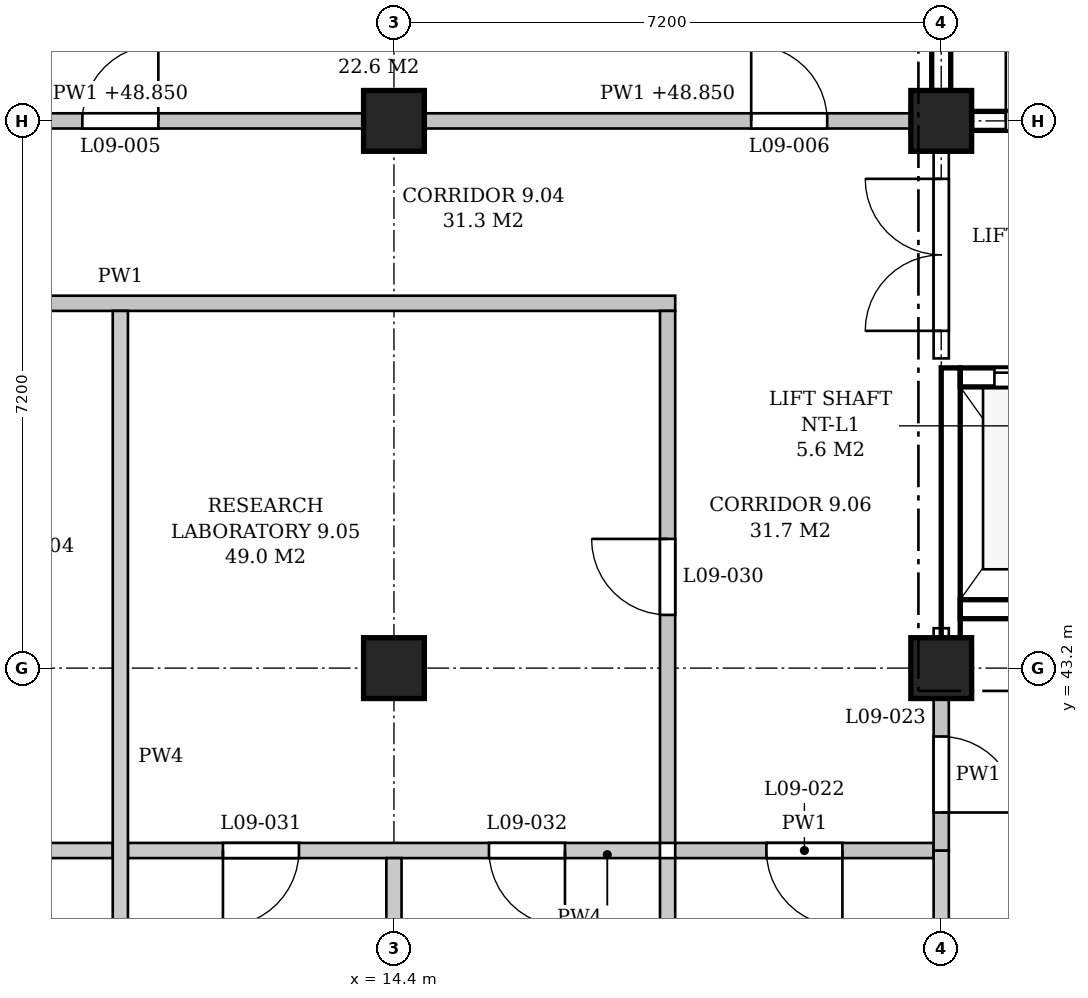
"""IFC4 building model, lengths in metres.
Left out: names, types, materials, properties, quantities, classifications, styles, units other than length and angle.
Written with IfcOpenShell. Run it as: python <this file> out.ifc"""

import sys

from ifc_helpers import new_model, si_unit, direction, frame, frame_2d, origin, origin_2d, place, context, subcontext, project, spatial, polyline, rectangle, outline, extrude, element, fill, save


model = new_model("IFC4")
c1 = context("Model", 3, precision=1e-05, world=origin(), true_north=direction((0.0, 1.0)))
c2 = subcontext(c1, "Body", "Model", "MODEL_VIEW")
j1 = project(units=[si_unit("LENGTHUNIT", "METRE"), si_unit("PLANEANGLEUNIT", "RADIAN")], contexts=[c1])
p1 = place(None, origin())
s1 = spatial("IfcSite", under=j1, at=p1, CompositionType="ELEMENT")
p2 = place(p1, origin())
s2 = spatial("IfcBuilding", under=s1, at=p2, CompositionType="ELEMENT")
p3 = place(p2, frame((0.0, 0.0, 45.3)))
s3 = spatial("IfcBuildingStorey", under=s2, at=p3, CompositionType="ELEMENT", Elevation=45.3)
for number, where, z_axis, x_axis in (
    (1, (14.4, 43.2, 0.0), (0.0, 0.0, 1.0), (1.0, 0.0, 0.0)),
    (2, (14.4, 50.4, 0.0), (0.0, 0.0, 1.0), (1.0, 0.0, 0.0)),
    (3, (21.6, 43.2, 0.0), (0.0, 0.0, 1.0), (1.0, 0.0, 0.0)),
    (4, (21.6, 50.4, 0.0), (0.0, 0.0, 1.0), (1.0, 0.0, 0.0)),
):
    element("IfcColumn", number, at=place(p3, frame(where, z_axis=z_axis, x_axis=x_axis)), inside=s3, PredefinedType="COLUMN", context=c2, shape_type="SweptSolid", body=[
        extrude(rectangle(XDim=0.8, YDim=0.8, at=origin_2d()), origin(), (0.0, 0.0, 1.0), 4.5),
    ])
p4 = place(p3, frame((22.0, 50.4, 0.0), z_axis=(0.0, 0.0, 1.0), x_axis=(1.0, 0.0, 0.0)))
e5 = element("IfcWall", 5, at=p4, inside=s3, PredefinedType="SHEAR", context=c2, shape_type="SweptSolid", body=[
    extrude(rectangle(XDim=6.4, YDim=0.25, at=frame_2d((3.2, 0.0))), origin(), (0.0, 0.0, 1.0), 3.55),
])
p5 = place(p4, frame((0.45, 0.0, 0.0)))
e6 = element("IfcOpeningElement", 6, at=p5, cuts=e5, PredefinedType="OPENING", context=c2, shape_type="SweptSolid", body=[
    extrude(rectangle(XDim=1.1, YDim=2.1, at=frame_2d((0.55, 1.05))), frame((0.0, 0.135, 0.0), z_axis=(0.0, -1.0, 0.0), x_axis=(1.0, 0.0, 0.0)), (0.0, 0.0, 1.0), 0.27),
])
p6 = place(p3, frame((21.6, 50.8, 0.0), z_axis=(0.0, 0.0, 1.0), x_axis=(0.0, 1.0, 0.0)))
e7 = element("IfcWall", 7, at=p6, inside=s3, PredefinedType="SHEAR", context=c2, shape_type="SweptSolid", body=[
    extrude(rectangle(XDim=6.4, YDim=0.25, at=frame_2d((3.2, 0.0))), origin(), (0.0, 0.0, 1.0), 3.55),
])
p7 = place(p3, frame((21.725, 43.6, -0.25), z_axis=(0.0, 0.0, 1.0), x_axis=(0.0, 1.0, 0.0)))
e8 = element("IfcWall", 8, at=p7, inside=s3, PredefinedType="SHEAR", context=c2, shape_type="SweptSolid", body=[
    extrude(rectangle(XDim=3.55, YDim=0.25, at=frame_2d((1.775, 0.0))), origin(), (0.0, 0.0, 1.0), 3.8),
])
p8 = place(p3, frame((21.85, 47.025, -0.25), z_axis=(0.0, 0.0, 1.0), x_axis=(1.0, 0.0, 0.0)))
e9 = element("IfcWall", 9, at=p8, inside=s3, PredefinedType="SHEAR", context=c2, shape_type="SweptSolid", body=[
    extrude(rectangle(XDim=2.0, YDim=0.25, at=frame_2d((1.0, 0.0))), origin(), (0.0, 0.0, 1.0), 4.5),
])
p9 = place(p8, frame((0.45, 0.0, 0.25)))
e10 = element("IfcOpeningElement", 10, at=p9, cuts=e9, PredefinedType="OPENING", context=c2, shape_type="SweptSolid", body=[
    extrude(rectangle(XDim=1.1, YDim=2.1, at=frame_2d((0.55, 1.05))), frame((0.0, 0.135, 0.0), z_axis=(0.0, -1.0, 0.0), x_axis=(1.0, 0.0, 0.0)), (0.0, 0.0, 1.0), 0.27),
])
p10 = place(p3, frame((21.85, 43.975, -0.25), z_axis=(0.0, 0.0, 1.0), x_axis=(1.0, 0.0, 0.0)))
e11 = element("IfcWall", 11, at=p10, inside=s3, PredefinedType="SHEAR", context=c2, shape_type="SweptSolid", body=[
    extrude(rectangle(XDim=2.0, YDim=0.25, at=frame_2d((1.0, 0.0))), origin(), (0.0, 0.0, 1.0), 4.5),
])
p11 = place(p3, frame((7.3, 40.8, 0.0), z_axis=(0.0, 0.0, 1.0), x_axis=(1.0, 0.0, 0.0)))
e12 = element("IfcWall", 12, at=p11, inside=s3, PredefinedType="PARTITIONING", context=c2, shape_type="SweptSolid", body=[
    extrude(outline(polyline([(0.0, 0.0), (3.4, 0.0), (3.4, 4.25), (0.125, 4.25), (0.125, 3.55), (0.0, 3.55), (0.0, 0.0)])), frame((0.0, 0.1, 0.0), z_axis=(0.0, -1.0, 0.0), x_axis=(1.0, 0.0, 0.0)), (0.0, 0.0, 1.0), 0.2),
])
p12 = place(p11, frame((1.2, 0.0, 0.0)))
e13 = element("IfcOpeningElement", 13, at=p12, cuts=e12, PredefinedType="OPENING", context=c2, shape_type="SweptSolid", body=[
    extrude(rectangle(XDim=1.0, YDim=2.1, at=frame_2d((0.5, 1.05))), frame((0.0, 0.11, 0.0), z_axis=(0.0, -1.0, 0.0), x_axis=(1.0, 0.0, 0.0)), (0.0, 0.0, 1.0), 0.22),
])
p13 = place(p3, frame((10.9, 40.8, 0.0), z_axis=(0.0, 0.0, 1.0), x_axis=(1.0, 0.0, 0.0)))
e14 = element("IfcWall", 14, at=p13, inside=s3, PredefinedType="PARTITIONING", context=c2, shape_type="SweptSolid", body=[
    extrude(outline(polyline([(0.0, 0.0), (7.0, 0.0), (7.0, 4.25), (3.725, 4.25), (3.725, 3.55), (3.275, 3.55), (3.275, 4.25), (0.0, 4.25), (0.0, 0.0)])), frame((0.0, 0.1, 0.0), z_axis=(0.0, -1.0, 0.0), x_axis=(1.0, 0.0, 0.0)), (0.0, 0.0, 1.0), 0.2),
])
p14 = place(p13, frame((1.25, 0.0, 0.0)))
e15 = element("IfcOpeningElement", 15, at=p14, cuts=e14, PredefinedType="OPENING", context=c2, shape_type="SweptSolid", body=[
    extrude(rectangle(XDim=1.0, YDim=2.1, at=frame_2d((0.5, 1.05))), frame((0.0, 0.11, 0.0), z_axis=(0.0, -1.0, 0.0), x_axis=(1.0, 0.0, 0.0)), (0.0, 0.0, 1.0), 0.22),
])
p15 = place(p13, frame((4.75, 0.0, 0.0)))
e16 = element("IfcOpeningElement", 16, at=p15, cuts=e14, PredefinedType="OPENING", context=c2, shape_type="SweptSolid", body=[
    extrude(rectangle(XDim=1.0, YDim=2.1, at=frame_2d((0.5, 1.05))), frame((0.0, 0.11, 0.0), z_axis=(0.0, -1.0, 0.0), x_axis=(1.0, 0.0, 0.0)), (0.0, 0.0, 1.0), 0.22),
])
p16 = place(p3, frame((18.1, 40.8, 0.0), z_axis=(0.0, 0.0, 1.0), x_axis=(1.0, 0.0, 0.0)))
e17 = element("IfcWall", 17, at=p16, inside=s3, PredefinedType="PARTITIONING", context=c2, shape_type="SweptSolid", body=[
    extrude(outline(polyline([(0.0, 0.0), (3.4, 0.0), (3.4, 3.55), (3.275, 3.55), (3.275, 4.25), (0.0, 4.25), (0.0, 0.0)])), frame((0.0, 0.1, 0.0), z_axis=(0.0, -1.0, 0.0), x_axis=(1.0, 0.0, 0.0)), (0.0, 0.0, 1.0), 0.2),
])
p17 = place(p16, frame((1.2, 0.0, 0.0)))
e18 = element("IfcOpeningElement", 18, at=p17, cuts=e17, PredefinedType="OPENING", context=c2, shape_type="SweptSolid", body=[
    extrude(rectangle(XDim=1.0, YDim=2.1, at=frame_2d((0.5, 1.05))), frame((0.0, 0.11, 0.0), z_axis=(0.0, -1.0, 0.0), x_axis=(1.0, 0.0, 0.0)), (0.0, 0.0, 1.0), 0.22),
])
p18 = place(p3, frame((3.5, 48.0, 0.0), z_axis=(0.0, 0.0, 1.0), x_axis=(1.0, 0.0, 0.0)))
e19 = element("IfcWall", 19, at=p18, inside=s3, PredefinedType="PARTITIONING", context=c2, shape_type="SweptSolid", body=[
    extrude(outline(polyline([(0.0, 0.0), (14.6, 0.0), (14.6, 4.25), (11.125, 4.25), (11.125, 3.55), (10.675, 3.55), (10.675, 4.25), (3.925, 4.25), (3.925, 3.55), (3.475, 3.55), (3.475, 4.25), (0.0, 4.25), (0.0, 0.0)])), frame((0.0, 0.1, 0.0), z_axis=(0.0, -1.0, 0.0), x_axis=(1.0, 0.0, 0.0)), (0.0, 0.0, 1.0), 0.2),
])
p19 = place(p18, frame((1.4, 0.0, 0.0)))
e20 = element("IfcOpeningElement", 20, at=p19, cuts=e19, PredefinedType="OPENING", context=c2, shape_type="SweptSolid", body=[
    extrude(rectangle(XDim=1.0, YDim=2.1, at=frame_2d((0.5, 1.05))), frame((0.0, 0.11, 0.0), z_axis=(0.0, -1.0, 0.0), x_axis=(1.0, 0.0, 0.0)), (0.0, 0.0, 1.0), 0.22),
])
p20 = place(p18, frame((5.0, 0.0, 0.0)))
e21 = element("IfcOpeningElement", 21, at=p20, cuts=e19, PredefinedType="OPENING", context=c2, shape_type="SweptSolid", body=[
    extrude(rectangle(XDim=1.0, YDim=2.1, at=frame_2d((0.5, 1.05))), frame((0.0, 0.11, 0.0), z_axis=(0.0, -1.0, 0.0), x_axis=(1.0, 0.0, 0.0)), (0.0, 0.0, 1.0), 0.22),
])
p21 = place(p3, frame((7.6, 50.4, 0.0), z_axis=(0.0, 0.0, 1.0), x_axis=(1.0, 0.0, 0.0)))
e22 = element("IfcWall", 22, at=p21, inside=s3, PredefinedType="PARTITIONING", context=c2, shape_type="SweptSolid", body=[
    extrude(rectangle(XDim=6.4, YDim=0.2, at=frame_2d((3.2, 0.0))), origin(), (0.0, 0.0, 1.0), 3.55),
])
p22 = place(p21, frame((2.7, 0.0, 0.0)))
e23 = element("IfcOpeningElement", 23, at=p22, cuts=e22, PredefinedType="OPENING", context=c2, shape_type="SweptSolid", body=[
    extrude(rectangle(XDim=1.0, YDim=2.1, at=frame_2d((0.5, 1.05))), frame((0.0, 0.11, 0.0), z_axis=(0.0, -1.0, 0.0), x_axis=(1.0, 0.0, 0.0)), (0.0, 0.0, 1.0), 0.22),
])
p23 = place(p3, frame((14.8, 50.4, 0.0), z_axis=(0.0, 0.0, 1.0), x_axis=(1.0, 0.0, 0.0)))
e24 = element("IfcWall", 24, at=p23, inside=s3, PredefinedType="PARTITIONING", context=c2, shape_type="SweptSolid", body=[
    extrude(rectangle(XDim=6.4, YDim=0.2, at=frame_2d((3.2, 0.0))), origin(), (0.0, 0.0, 1.0), 3.55),
])
p24 = place(p23, frame((4.3, 0.0, 0.0)))
e25 = element("IfcOpeningElement", 25, at=p24, cuts=e24, PredefinedType="OPENING", context=c2, shape_type="SweptSolid", body=[
    extrude(rectangle(XDim=1.0, YDim=2.1, at=frame_2d((0.5, 1.05))), frame((0.0, 0.11, 0.0), z_axis=(0.0, -1.0, 0.0), x_axis=(1.0, 0.0, 0.0)), (0.0, 0.0, 1.0), 0.22),
])
p25 = place(p3, frame((10.8, 36.15, 0.0), z_axis=(0.0, 0.0, 1.0), x_axis=(0.0, 1.0, 0.0)))
e26 = element("IfcWall", 26, at=p25, inside=s3, PredefinedType="PARTITIONING", context=c2, shape_type="SweptSolid", body=[
    extrude(outline(polyline([(0.0, 0.0), (11.75, 0.0), (11.75, 4.25), (7.275, 4.25), (7.275, 3.55), (6.825, 3.55), (6.825, 4.25), (0.05, 4.25), (0.05, 3.65), (0.0, 3.65), (0.0, 0.0)])), frame((0.0, 0.1, 0.0), z_axis=(0.0, -1.0, 0.0), x_axis=(1.0, 0.0, 0.0)), (0.0, 0.0, 1.0), 0.2),
])
p26 = place(p3, frame((14.4, 36.4, 0.0), z_axis=(0.0, 0.0, 1.0), x_axis=(0.0, 1.0, 0.0)))
e27 = element("IfcWall", 27, at=p26, inside=s3, PredefinedType="PARTITIONING", context=c2, shape_type="SweptSolid", body=[
    extrude(rectangle(XDim=4.3, YDim=0.2, at=frame_2d((2.15, 0.0))), origin(), (0.0, 0.0, 1.0), 3.55),
])
p27 = place(p3, frame((18.0, 36.15, 0.0), z_axis=(0.0, 0.0, 1.0), x_axis=(0.0, 1.0, 0.0)))
e28 = element("IfcWall", 28, at=p27, inside=s3, PredefinedType="PARTITIONING", context=c2, shape_type="SweptSolid", body=[
    extrude(outline(polyline([(0.0, 0.0), (4.55, 0.0), (4.55, 4.25), (0.05, 4.25), (0.05, 3.65), (0.0, 3.65), (0.0, 0.0)])), frame((0.0, 0.1, 0.0), z_axis=(0.0, -1.0, 0.0), x_axis=(1.0, 0.0, 0.0)), (0.0, 0.0, 1.0), 0.2),
])
p28 = place(p3, frame((18.0, 40.9, 0.0), z_axis=(0.0, 0.0, 1.0), x_axis=(0.0, 1.0, 0.0)))
e29 = element("IfcWall", 29, at=p28, inside=s3, PredefinedType="PARTITIONING", context=c2, shape_type="SweptSolid", body=[
    extrude(outline(polyline([(0.0, 0.0), (7.0, 0.0), (7.0, 4.25), (2.525, 4.25), (2.525, 3.55), (2.075, 3.55), (2.075, 4.25), (0.0, 4.25), (0.0, 0.0)])), frame((0.0, 0.1, 0.0), z_axis=(0.0, -1.0, 0.0), x_axis=(1.0, 0.0, 0.0)), (0.0, 0.0, 1.0), 0.2),
])
p29 = place(p28, frame((3.0, 0.0, 0.0)))
e30 = element("IfcOpeningElement", 30, at=p29, cuts=e29, PredefinedType="OPENING", context=c2, shape_type="SweptSolid", body=[
    extrude(rectangle(XDim=1.0, YDim=2.1, at=frame_2d((0.5, 1.05))), frame((0.0, 0.11, 0.0), z_axis=(0.0, -1.0, 0.0), x_axis=(1.0, 0.0, 0.0)), (0.0, 0.0, 1.0), 0.22),
])
p30 = place(p3, frame((21.6, 36.4, 0.0), z_axis=(0.0, 0.0, 1.0), x_axis=(0.0, 1.0, 0.0)))
e31 = element("IfcWall", 31, at=p30, inside=s3, PredefinedType="PARTITIONING", context=c2, shape_type="SweptSolid", body=[
    extrude(rectangle(XDim=4.4, YDim=0.2, at=frame_2d((2.2, 0.0))), origin(), (0.0, 0.0, 1.0), 3.55),
])
p31 = place(p3, frame((21.6, 40.8, 0.0), z_axis=(0.0, 0.0, 1.0), x_axis=(0.0, 1.0, 0.0)))
e32 = element("IfcWall", 32, at=p31, inside=s3, PredefinedType="PARTITIONING", context=c2, shape_type="SweptSolid", body=[
    extrude(rectangle(XDim=2.0, YDim=0.2, at=frame_2d((1.0, 0.0))), origin(), (0.0, 0.0, 1.0), 3.55),
])
p32 = place(p31, frame((0.5, 0.0, 0.0)))
e33 = element("IfcOpeningElement", 33, at=p32, cuts=e32, PredefinedType="OPENING", context=c2, shape_type="SweptSolid", body=[
    extrude(rectangle(XDim=1.0, YDim=2.1, at=frame_2d((0.5, 1.05))), frame((0.0, 0.11, 0.0), z_axis=(0.0, -1.0, 0.0), x_axis=(1.0, 0.0, 0.0)), (0.0, 0.0, 1.0), 0.22),
])
p33 = place(p3, frame((21.6, 43.6, 0.0), z_axis=(0.0, 0.0, 1.0), x_axis=(0.0, 1.0, 0.0)))
e34 = element("IfcWall", 34, at=p33, inside=s3, PredefinedType="PARTITIONING", context=c2, shape_type="SweptSolid", body=[
    extrude(rectangle(XDim=0.125, YDim=0.2, at=frame_2d((0.062, 0.0))), origin(), (0.0, 0.0, 1.0), 3.55),
])
p34 = place(p3, frame((21.6, 47.275, 0.0), z_axis=(0.0, 0.0, 1.0), x_axis=(0.0, 1.0, 0.0)))
e35 = element("IfcWall", 35, at=p34, inside=s3, PredefinedType="PARTITIONING", context=c2, shape_type="SweptSolid", body=[
    extrude(rectangle(XDim=2.725, YDim=0.2, at=frame_2d((1.363, 0.0))), origin(), (0.0, 0.0, 1.0), 3.55),
])
p35 = place(p34, frame((0.363, 0.0, 0.0)))
e36 = element("IfcOpeningElement", 36, at=p35, cuts=e35, PredefinedType="OPENING", context=c2, shape_type="SweptSolid", body=[
    extrude(rectangle(XDim=2.0, YDim=2.4, at=frame_2d((1.0, 1.2))), frame((0.0, 0.11, 0.0), z_axis=(0.0, -1.0, 0.0), x_axis=(1.0, 0.0, 0.0)), (0.0, 0.0, 1.0), 0.22),
])
p36 = place(p5, origin())
e37 = element("IfcDoor", 37, at=p36, inside=s3, OperationType="SINGLE_SWING_LEFT", PredefinedType="DOOR", context=c2, shape_type="SweptSolid", body=[
    extrude(rectangle(XDim=1.1, YDim=2.1, at=frame_2d((0.55, 1.05))), frame((0.0, 0.025, 0.0), z_axis=(0.0, -1.0, 0.0), x_axis=(1.0, 0.0, 0.0)), (0.0, 0.0, 1.0), 0.05),
])
fill(e6, e37)
p37 = place(p9, origin())
e38 = element("IfcDoor", 38, at=p37, inside=s3, OperationType="SLIDING_TO_LEFT", PredefinedType="DOOR", context=c2, shape_type="SweptSolid", body=[
    extrude(rectangle(XDim=1.1, YDim=2.1, at=frame_2d((0.55, 1.05))), frame((0.0, 0.025, 0.0), z_axis=(0.0, -1.0, 0.0), x_axis=(1.0, 0.0, 0.0)), (0.0, 0.0, 1.0), 0.05),
])
fill(e10, e38)
p38 = place(p35, origin())
e39 = element("IfcDoor", 39, at=p38, inside=s3, OperationType="DOUBLE_DOOR_SINGLE_SWING", PredefinedType="DOOR", context=c2, shape_type="SweptSolid", body=[
    extrude(rectangle(XDim=2.0, YDim=2.4, at=frame_2d((1.0, 1.2))), frame((0.0, 0.025, 0.0), z_axis=(0.0, -1.0, 0.0), x_axis=(1.0, 0.0, 0.0)), (0.0, 0.0, 1.0), 0.05),
])
fill(e36, e39)
p39 = place(p22, origin())
e40 = element("IfcDoor", 40, at=p39, inside=s3, OperationType="SINGLE_SWING_RIGHT", PredefinedType="DOOR", context=c2, shape_type="SweptSolid", body=[
    extrude(rectangle(XDim=1.0, YDim=2.1, at=frame_2d((0.5, 1.05))), frame((0.0, 0.025, 0.0), z_axis=(0.0, -1.0, 0.0), x_axis=(1.0, 0.0, 0.0)), (0.0, 0.0, 1.0), 0.05),
])
fill(e23, e40)
p40 = place(p24, origin())
e41 = element("IfcDoor", 41, at=p40, inside=s3, OperationType="SINGLE_SWING_LEFT", PredefinedType="DOOR", context=c2, shape_type="SweptSolid", body=[
    extrude(rectangle(XDim=1.0, YDim=2.1, at=frame_2d((0.5, 1.05))), frame((0.0, 0.025, 0.0), z_axis=(0.0, -1.0, 0.0), x_axis=(1.0, 0.0, 0.0)), (0.0, 0.0, 1.0), 0.05),
])
fill(e25, e41)
p41 = place(p17, frame((1.0, 0.0, 0.0), z_axis=(0.0, 0.0, 1.0), x_axis=(-1.0, 0.0, 0.0)))
e42 = element("IfcDoor", 42, at=p41, inside=s3, OperationType="SINGLE_SWING_LEFT", PredefinedType="DOOR", context=c2, shape_type="SweptSolid", body=[
    extrude(rectangle(XDim=1.0, YDim=2.1, at=frame_2d((0.5, 1.05))), frame((0.0, 0.025, 0.0), z_axis=(0.0, -1.0, 0.0), x_axis=(1.0, 0.0, 0.0)), (0.0, 0.0, 1.0), 0.05),
])
fill(e18, e42)
p42 = place(p32, frame((1.0, 0.0, 0.0), z_axis=(0.0, 0.0, 1.0), x_axis=(-1.0, 0.0, 0.0)))
e43 = element("IfcDoor", 43, at=p42, inside=s3, OperationType="SINGLE_SWING_RIGHT", PredefinedType="DOOR", context=c2, shape_type="SweptSolid", body=[
    extrude(rectangle(XDim=1.0, YDim=2.1, at=frame_2d((0.5, 1.05))), frame((0.0, 0.025, 0.0), z_axis=(0.0, -1.0, 0.0), x_axis=(1.0, 0.0, 0.0)), (0.0, 0.0, 1.0), 0.05),
])
fill(e33, e43)
p43 = place(p29, origin())
e44 = element("IfcDoor", 44, at=p43, inside=s3, OperationType="SINGLE_SWING_RIGHT", PredefinedType="DOOR", context=c2, shape_type="SweptSolid", body=[
    extrude(rectangle(XDim=1.0, YDim=2.1, at=frame_2d((0.5, 1.05))), frame((0.0, 0.025, 0.0), z_axis=(0.0, -1.0, 0.0), x_axis=(1.0, 0.0, 0.0)), (0.0, 0.0, 1.0), 0.05),
])
fill(e30, e44)
p44 = place(p14, frame((1.0, 0.0, 0.0), z_axis=(0.0, 0.0, 1.0), x_axis=(-1.0, 0.0, 0.0)))
e45 = element("IfcDoor", 45, at=p44, inside=s3, OperationType="SINGLE_SWING_RIGHT", PredefinedType="DOOR", context=c2, shape_type="SweptSolid", body=[
    extrude(rectangle(XDim=1.0, YDim=2.1, at=frame_2d((0.5, 1.05))), frame((0.0, 0.025, 0.0), z_axis=(0.0, -1.0, 0.0), x_axis=(1.0, 0.0, 0.0)), (0.0, 0.0, 1.0), 0.05),
])
fill(e15, e45)
p45 = place(p15, frame((1.0, 0.0, 0.0), z_axis=(0.0, 0.0, 1.0), x_axis=(-1.0, 0.0, 0.0)))
e46 = element("IfcDoor", 46, at=p45, inside=s3, OperationType="SINGLE_SWING_LEFT", PredefinedType="DOOR", context=c2, shape_type="SweptSolid", body=[
    extrude(rectangle(XDim=1.0, YDim=2.1, at=frame_2d((0.5, 1.05))), frame((0.0, 0.025, 0.0), z_axis=(0.0, -1.0, 0.0), x_axis=(1.0, 0.0, 0.0)), (0.0, 0.0, 1.0), 0.05),
])
fill(e16, e46)
save(model, sys.argv[1])
